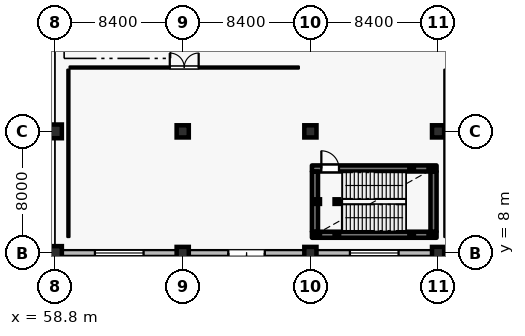
"""IFC4 building model, lengths in metres.
Left out: names, types, materials, properties, quantities, classifications, styles, units other than length and angle.
Written with IfcOpenShell. Run it as: python <this file> out.ifc"""

import sys

from ifc_helpers import new_model, si_unit, direction, frame, frame_2d, origin, origin_2d, place, context, subcontext, project, spatial, rectangle, hollow_rectangle, extrude, element, fill, save


model = new_model("IFC4")
c1 = context("Model", 3, precision=1e-05, world=origin(), true_north=direction((0.0, 1.0)))
c2 = subcontext(c1, "Body", "Model", "MODEL_VIEW")
j1 = project(units=[si_unit("LENGTHUNIT", "METRE"), si_unit("PLANEANGLEUNIT", "RADIAN")], contexts=[c1])
p1 = place(None, origin())
s1 = spatial("IfcSite", under=j1, at=p1, CompositionType="ELEMENT")
p2 = place(p1, origin())
s2 = spatial("IfcBuilding", under=s1, at=p2, CompositionType="ELEMENT")
p3 = place(p2, origin())
s3 = spatial("IfcBuildingStorey", under=s2, at=p3, CompositionType="ELEMENT", Elevation=0.0)
for number, where, z_axis, x_axis in (
    (1, (58.8, 8.0, 0.0), (0.0, 0.0, 1.0), (1.0, 0.0, 0.0)),
    (2, (58.8, 16.0, 0.0), (0.0, 0.0, 1.0), (1.0, 0.0, 0.0)),
):
    element("IfcColumn", number, at=place(p3, frame(where, z_axis=z_axis, x_axis=x_axis)), inside=s3, PredefinedType="COLUMN", context=c2, shape_type="SweptSolid", body=[
        extrude(rectangle(XDim=0.9, YDim=0.9, at=origin_2d()), origin(), (0.0, 0.0, 1.0), 6.0),
    ])
for number, where, z_axis, x_axis in (
    (3, (67.2, 8.0, 0.0), (0.0, 0.0, 1.0), (1.0, 0.0, 0.0)),
    (4, (67.2, 16.0, 0.0), (0.0, 0.0, 1.0), (1.0, 0.0, 0.0)),
    (5, (75.6, 8.0, 0.0), (0.0, 0.0, 1.0), (1.0, 0.0, 0.0)),
    (6, (75.6, 16.0, 0.0), (0.0, 0.0, 1.0), (1.0, 0.0, 0.0)),
    (7, (84.0, 8.0, 0.0), (0.0, 0.0, 1.0), (1.0, 0.0, 0.0)),
    (8, (84.0, 16.0, 0.0), (0.0, 0.0, 1.0), (1.0, 0.0, 0.0)),
):
    element("IfcColumn", number, at=place(p3, frame(where, z_axis=z_axis, x_axis=x_axis)), inside=s3, PredefinedType="COLUMN", context=c2, shape_type="SweptSolid", body=[
        extrude(rectangle(XDim=0.8, YDim=0.8, at=origin_2d()), origin(), (0.0, 0.0, 1.0), 6.0),
    ])
p4 = place(p3, frame((92.0, 8.0, 0.0), z_axis=(0.0, 0.0, 1.0), x_axis=(-1.0, 0.0, 0.0)))
e9 = element("IfcWall", 9, at=p4, inside=s3, PredefinedType="SOLIDWALL", context=c2, shape_type="SweptSolid", body=[
    extrude(rectangle(XDim=7.6, YDim=0.38, at=frame_2d((3.8, 0.0))), origin(), (0.0, 0.0, 1.0), 5.0),
])
p5 = place(p4, frame((2.2, 0.0, 0.95)))
e10 = element("IfcOpeningElement", 10, at=p5, cuts=e9, PredefinedType="OPENING", context=c2, shape_type="SweptSolid", body=[
    extrude(rectangle(XDim=3.2, YDim=2.4, at=frame_2d((1.6, 1.2))), frame((0.0, 0.2, 0.0), z_axis=(0.0, -1.0, 0.0), x_axis=(1.0, 0.0, 0.0)), (0.0, 0.0, 1.0), 0.4),
])
p6 = place(p3, frame((83.6, 8.0, 0.0), z_axis=(0.0, 0.0, 1.0), x_axis=(-1.0, 0.0, 0.0)))
e11 = element("IfcWall", 11, at=p6, inside=s3, PredefinedType="SOLIDWALL", context=c2, shape_type="SweptSolid", body=[
    extrude(rectangle(XDim=7.6, YDim=0.38, at=frame_2d((3.8, 0.0))), origin(), (0.0, 0.0, 1.0), 5.0),
])
p7 = place(p6, frame((2.2, 0.0, 0.95)))
e12 = element("IfcOpeningElement", 12, at=p7, cuts=e11, PredefinedType="OPENING", context=c2, shape_type="SweptSolid", body=[
    extrude(rectangle(XDim=3.2, YDim=2.4, at=frame_2d((1.6, 1.2))), frame((0.0, 0.2, 0.0), z_axis=(0.0, -1.0, 0.0), x_axis=(1.0, 0.0, 0.0)), (0.0, 0.0, 1.0), 0.4),
])
p8 = place(p3, frame((75.2, 8.0, 0.0), z_axis=(0.0, 0.0, 1.0), x_axis=(-1.0, 0.0, 0.0)))
e13 = element("IfcWall", 13, at=p8, inside=s3, PredefinedType="SOLIDWALL", context=c2, shape_type="SweptSolid", body=[
    extrude(rectangle(XDim=7.6, YDim=0.38, at=frame_2d((3.8, 0.0))), origin(), (0.0, 0.0, 1.0), 5.0),
])
p9 = place(p8, frame((2.6, 0.0, 0.0)))
e14 = element("IfcOpeningElement", 14, at=p9, cuts=e13, PredefinedType="OPENING", context=c2, shape_type="SweptSolid", body=[
    extrude(rectangle(XDim=2.4, YDim=2.6, at=frame_2d((1.2, 1.3))), frame((0.0, 0.2, 0.0), z_axis=(0.0, -1.0, 0.0), x_axis=(1.0, 0.0, 0.0)), (0.0, 0.0, 1.0), 0.4),
])
p10 = place(p3, frame((66.8, 8.0, 0.0), z_axis=(0.0, 0.0, 1.0), x_axis=(-1.0, 0.0, 0.0)))
e15 = element("IfcWall", 15, at=p10, inside=s3, PredefinedType="SOLIDWALL", context=c2, shape_type="SweptSolid", body=[
    extrude(rectangle(XDim=7.55, YDim=0.38, at=frame_2d((3.775, 0.0))), origin(), (0.0, 0.0, 1.0), 5.0),
])
p11 = place(p10, frame((2.175, 0.0, 0.95)))
e16 = element("IfcOpeningElement", 16, at=p11, cuts=e15, PredefinedType="OPENING", context=c2, shape_type="SweptSolid", body=[
    extrude(rectangle(XDim=3.2, YDim=2.4, at=frame_2d((1.6, 1.2))), frame((0.0, 0.2, 0.0), z_axis=(0.0, -1.0, 0.0), x_axis=(1.0, 0.0, 0.0)), (0.0, 0.0, 1.0), 0.4),
])
p12 = place(p3, frame((75.7, 9.2, 0.0), z_axis=(0.0, 0.0, 1.0), x_axis=(1.0, 0.0, 0.0)))
e17 = element("IfcWall", 17, at=p12, inside=s3, PredefinedType="SHEAR", context=c2, shape_type="SweptSolid", body=[
    extrude(rectangle(XDim=8.2, YDim=0.4, at=frame_2d((4.1, 0.0))), origin(), (0.0, 0.0, 1.0), 5.675),
])
p13 = place(p3, frame((83.7, 9.405, 0.0), z_axis=(0.0, 0.0, 1.0), x_axis=(0.0, 1.0, 0.0)))
e18 = element("IfcWall", 18, at=p13, inside=s3, PredefinedType="SHEAR", context=c2, shape_type="SweptSolid", body=[
    extrude(rectangle(XDim=3.95, YDim=0.4, at=frame_2d((1.975, 0.0))), origin(), (0.0, 0.0, 1.0), 5.675),
])
p14 = place(p3, frame((75.7, 13.56, 0.0), z_axis=(0.0, 0.0, 1.0), x_axis=(1.0, 0.0, 0.0)))
e19 = element("IfcWall", 19, at=p14, inside=s3, PredefinedType="SHEAR", context=c2, shape_type="SweptSolid", body=[
    extrude(rectangle(XDim=8.2, YDim=0.4, at=frame_2d((4.1, 0.0))), origin(), (0.0, 0.0, 1.0), 5.675),
])
p15 = place(p14, frame((0.62, 0.0, 0.0)))
e20 = element("IfcOpeningElement", 20, at=p15, cuts=e19, PredefinedType="OPENING", context=c2, shape_type="SweptSolid", body=[
    extrude(rectangle(XDim=1.16, YDim=2.2, at=frame_2d((0.58, 1.1))), frame((0.0, 0.21, 0.0), z_axis=(0.0, -1.0, 0.0), x_axis=(1.0, 0.0, 0.0)), (0.0, 0.0, 1.0), 0.42),
])
p16 = place(p3, frame((75.9, 9.405, 0.0), z_axis=(0.0, 0.0, 1.0), x_axis=(0.0, 1.0, 0.0)))
e21 = element("IfcWall", 21, at=p16, inside=s3, PredefinedType="SHEAR", context=c2, shape_type="SweptSolid", body=[
    extrude(rectangle(XDim=3.95, YDim=0.4, at=frame_2d((1.975, 0.0))), origin(), (0.0, 0.0, 1.0), 5.675),
])
for number, where, z_axis, x_axis in (
    (22, (76.08, 9.2, 0.0), (0.0, 0.0, 1.0), (1.0, 0.0, 0.0)),
    (23, (76.08, 11.38, 0.0), (0.0, 0.0, 1.0), (1.0, 0.0, 0.0)),
    (24, (77.34, 9.2, 0.0), (0.0, 0.0, 1.0), (1.0, 0.0, 0.0)),
    (25, (77.34, 11.38, 0.0), (0.0, 0.0, 1.0), (1.0, 0.0, 0.0)),
):
    element("IfcColumn", number, at=place(p3, frame(where, z_axis=z_axis, x_axis=x_axis)), inside=s3, PredefinedType="COLUMN", context=c2, shape_type="SweptSolid", body=[
        extrude(hollow_rectangle(XDim=0.3, YDim=0.3, WallThickness=0.012, at=origin_2d()), origin(), (0.0, 0.0, 1.0), 5.82),
    ])
for number, where, z_axis, x_axis in (
    (26, (82.26, 9.2, -2.7), (0.0, 0.0, 1.0), (1.0, 0.0, 0.0)),
    (27, (82.26, 13.56, -2.7), (0.0, 0.0, 1.0), (1.0, 0.0, 0.0)),
    (28, (83.52, 9.2, -2.7), (0.0, 0.0, 1.0), (1.0, 0.0, 0.0)),
    (29, (83.52, 13.56, -2.7), (0.0, 0.0, 1.0), (1.0, 0.0, 0.0)),
):
    element("IfcColumn", number, at=place(p3, frame(where, z_axis=z_axis, x_axis=x_axis)), inside=s3, PredefinedType="COLUMN", context=c2, shape_type="SweptSolid", body=[
        extrude(hollow_rectangle(XDim=0.3, YDim=0.3, WallThickness=0.012, at=origin_2d()), origin(), (0.0, 0.0, 1.0), 5.52),
    ])
p17 = place(p3, frame((59.76, 20.2, 0.0), z_axis=(0.0, 0.0, 1.0), x_axis=(1.0, 0.0, 0.0)))
e30 = element("IfcWall", 30, at=p17, inside=s3, PredefinedType="PARTITIONING", context=c2, shape_type="SweptSolid", body=[
    extrude(rectangle(XDim=15.08, YDim=0.14, at=frame_2d((7.54, 0.0))), origin(), (0.0, 0.0, 1.0), 5.675),
])
p18 = place(p17, frame((6.59, 0.0, 0.0)))
e31 = element("IfcOpeningElement", 31, at=p18, cuts=e30, PredefinedType="OPENING", context=c2, shape_type="SweptSolid", body=[
    extrude(rectangle(XDim=1.9, YDim=2.4, at=frame_2d((0.95, 1.2))), frame((0.0, 0.08, 0.0), z_axis=(0.0, -1.0, 0.0), x_axis=(1.0, 0.0, 0.0)), (0.0, 0.0, 1.0), 0.16),
])
for number, where, z_axis, x_axis in (
    (32, (59.68, 9.05, 0.0), (0.0, 0.0, 1.0), (0.0, 1.0, 0.0)),
    (33, (84.48, 9.05, 0.0), (0.0, 0.0, 1.0), (0.0, 1.0, 0.0)),
):
    element("IfcWall", number, at=place(p3, frame(where, z_axis=z_axis, x_axis=x_axis)), inside=s3, PredefinedType="PARTITIONING", context=c2, shape_type="SweptSolid", body=[
        extrude(rectangle(XDim=11.01, YDim=0.14, at=frame_2d((5.505, 0.0))), origin(), (0.0, 0.0, 1.0), 5.675),
    ])
p19 = place(p7, origin())
e34 = element("IfcWindow", 34, at=p19, inside=s3, PartitioningType="DOUBLE_PANEL_VERTICAL", PredefinedType="WINDOW", context=c2, shape_type="SweptSolid", body=[
    extrude(rectangle(XDim=3.2, YDim=2.4, at=frame_2d((1.6, 1.2))), frame((0.0, 0.03, 0.0), z_axis=(0.0, -1.0, 0.0), x_axis=(1.0, 0.0, 0.0)), (0.0, 0.0, 1.0), 0.06),
])
fill(e12, e34)
p20 = place(p9, origin())
e35 = element("IfcDoor", 35, at=p20, inside=s3, OperationType="DOUBLE_DOOR_SINGLE_SWING", PredefinedType="DOOR", context=c2, shape_type="SweptSolid", body=[
    extrude(rectangle(XDim=2.4, YDim=2.6, at=frame_2d((1.2, 1.3))), frame((0.0, 0.025, 0.0), z_axis=(0.0, -1.0, 0.0), x_axis=(1.0, 0.0, 0.0)), (0.0, 0.0, 1.0), 0.05),
])
fill(e14, e35)
p21 = place(p11, origin())
e36 = element("IfcWindow", 36, at=p21, inside=s3, PartitioningType="DOUBLE_PANEL_VERTICAL", PredefinedType="WINDOW", context=c2, shape_type="SweptSolid", body=[
    extrude(rectangle(XDim=3.2, YDim=2.4, at=frame_2d((1.6, 1.2))), frame((0.0, 0.03, 0.0), z_axis=(0.0, -1.0, 0.0), x_axis=(1.0, 0.0, 0.0)), (0.0, 0.0, 1.0), 0.06),
])
fill(e16, e36)
p22 = place(p15, origin())
e37 = element("IfcDoor", 37, at=p22, inside=s3, OperationType="SINGLE_SWING_LEFT", PredefinedType="DOOR", context=c2, shape_type="SweptSolid", body=[
    extrude(rectangle(XDim=1.16, YDim=2.2, at=frame_2d((0.58, 1.1))), frame((0.0, 0.025, 0.0), z_axis=(0.0, -1.0, 0.0), x_axis=(1.0, 0.0, 0.0)), (0.0, 0.0, 1.0), 0.05),
])
fill(e20, e37)
p23 = place(p18, origin())
e38 = element("IfcDoor", 38, at=p23, inside=s3, OperationType="DOUBLE_DOOR_SINGLE_SWING", PredefinedType="DOOR", context=c2, shape_type="SweptSolid", body=[
    extrude(rectangle(XDim=1.9, YDim=2.4, at=frame_2d((0.95, 1.2))), frame((0.0, 0.025, 0.0), z_axis=(0.0, -1.0, 0.0), x_axis=(1.0, 0.0, 0.0)), (0.0, 0.0, 1.0), 0.05),
])
fill(e31, e38)
save(model, sys.argv[1])
